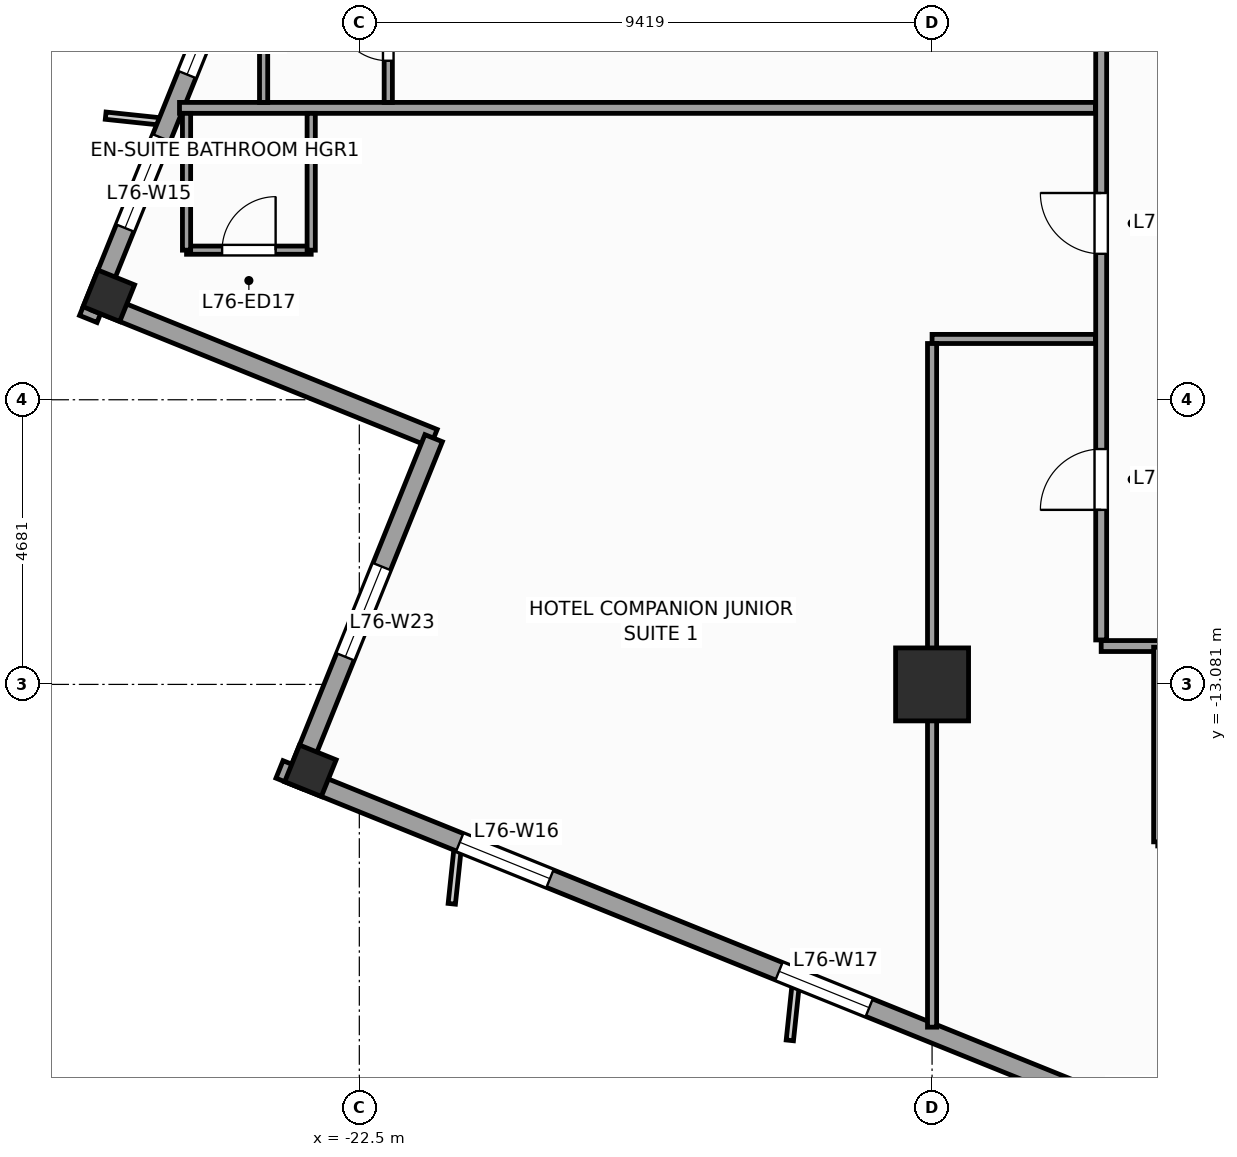
"""IFC4 building model, lengths in metres.
Left out: names, types, materials, properties, quantities, classifications, styles, units other than length and angle.
Written with IfcOpenShell. Run it as: python <this file> out.ifc"""

import sys

from ifc_helpers import new_model, si_unit, direction, frame, frame_2d, origin, origin_2d, place, context, subcontext, project, spatial, rectangle, extrude, source, transform, mapped, element, fill, save


model = new_model("IFC4")
c1 = context("Model", 3, precision=1e-05, world=origin(), true_north=direction((0.0, 1.0)))
c2 = subcontext(c1, "Body", "Model", "MODEL_VIEW")
j1 = project(units=[si_unit("LENGTHUNIT", "METRE"), si_unit("PLANEANGLEUNIT", "RADIAN")], contexts=[c1])
p1 = place(None, origin())
s1 = spatial("IfcSite", under=j1, at=p1, CompositionType="ELEMENT")
p2 = place(p1, origin())
s2 = spatial("IfcBuilding", under=s1, at=p2, CompositionType="ELEMENT")
p3 = place(p2, frame((0.0, 0.0, 308.4)))
s3 = spatial("IfcBuildingStorey", under=s2, at=p3, CompositionType="ELEMENT", Elevation=308.4)
m1 = source(origin(), c2, "Body", "SweptSolid", [
    extrude(rectangle(XDim=1.2, YDim=1.2, at=origin_2d()), origin(), (0.0, 0.0, 1.0), 3.6),
])
p4 = place(p3, frame((-13.081, -13.081, 0.0), z_axis=(0.0, 0.0, 1.0), x_axis=(1.0, 0.0, 0.0)))
e1 = element("IfcColumn", 1, at=p4, inside=s3, PredefinedType="COLUMN", context=c2, shape_type="MappedRepresentation", body=[
    mapped(m1, transform((0.0, 0.0, 0.0), scale=1.0)),
])
m2 = source(origin(), c2, "Body", "SweptSolid", [
    extrude(rectangle(XDim=0.65, YDim=0.65, at=origin_2d()), origin(), (0.0, 0.0, 1.0), 3.6),
])
for number, where, z_axis, x_axis in (
    (2, (-26.62, -6.69, 0.0), (0.0, 0.0, 1.0), (0.375, 0.927, 0.0)),
    (3, (-23.304, -14.501, 0.0), (0.0, 0.0, 1.0), (0.375, 0.927, 0.0)),
):
    element("IfcColumn", number, at=place(p3, frame(where, z_axis=z_axis, x_axis=x_axis)), inside=s3, PredefinedType="COLUMN", context=c2, shape_type="MappedRepresentation", body=[
        mapped(m2, transform((0.0, 0.0, 0.0), scale=1.0)),
    ])
p5 = place(p3, frame((-14.479, 23.813, 0.0), z_axis=(0.0, 0.0, 1.0), x_axis=(-0.374609557019, -0.927182657188, 0.0)))
e4 = element("IfcWall", 4, at=p5, inside=s3, PredefinedType="STANDARD", context=c2, shape_type="SweptSolid", body=[
    extrude(rectangle(XDim=33.31, YDim=0.31, at=frame_2d((16.655, 0.0))), origin(), (0.0, 0.0, 1.0), 2.75),
])
p6 = place(p5, frame((3.197, 0.0, 0.47)))
e5 = element("IfcOpeningElement", 5, at=p6, cuts=e4, PredefinedType="OPENING", context=c2, shape_type="SweptSolid", body=[
    extrude(rectangle(XDim=1.6, YDim=2.1, at=frame_2d((0.8, 1.05))), frame((0.0, 0.165, 0.0), z_axis=(0.0, -1.0, 0.0), x_axis=(1.0, 0.0, 0.0)), (0.0, 0.0, 1.0), 0.33),
])
p7 = place(p5, frame((8.86, 0.0, 0.47)))
e6 = element("IfcOpeningElement", 6, at=p7, cuts=e4, PredefinedType="OPENING", context=c2, shape_type="SweptSolid", body=[
    extrude(rectangle(XDim=1.6, YDim=2.1, at=frame_2d((0.8, 1.05))), frame((0.0, 0.165, 0.0), z_axis=(0.0, -1.0, 0.0), x_axis=(1.0, 0.0, 0.0)), (0.0, 0.0, 1.0), 0.33),
])
p8 = place(p5, frame((14.439, 0.0, 0.47)))
e7 = element("IfcOpeningElement", 7, at=p8, cuts=e4, PredefinedType="OPENING", context=c2, shape_type="SweptSolid", body=[
    extrude(rectangle(XDim=1.6, YDim=2.1, at=frame_2d((0.8, 1.05))), frame((0.0, 0.165, 0.0), z_axis=(0.0, -1.0, 0.0), x_axis=(1.0, 0.0, 0.0)), (0.0, 0.0, 1.0), 0.33),
])
p9 = place(p5, frame((21.851, 0.0, 0.47)))
e8 = element("IfcOpeningElement", 8, at=p9, cuts=e4, PredefinedType="OPENING", context=c2, shape_type="SweptSolid", body=[
    extrude(rectangle(XDim=1.6, YDim=2.1, at=frame_2d((0.8, 1.05))), frame((0.0, 0.165, 0.0), z_axis=(0.0, -1.0, 0.0), x_axis=(1.0, 0.0, 0.0)), (0.0, 0.0, 1.0), 0.33),
])
p10 = place(p5, frame((30.097, 0.0, 0.47)))
e9 = element("IfcOpeningElement", 9, at=p10, cuts=e4, PredefinedType="OPENING", context=c2, shape_type="SweptSolid", body=[
    extrude(rectangle(XDim=1.6, YDim=2.1, at=frame_2d((0.8, 1.05))), frame((0.0, 0.165, 0.0), z_axis=(0.0, -1.0, 0.0), x_axis=(1.0, 0.0, 0.0)), (0.0, 0.0, 1.0), 0.33),
])
p11 = place(p5, frame((27.374, 0.0, 0.47)))
e10 = element("IfcOpeningElement", 10, at=p11, cuts=e4, PredefinedType="OPENING", context=c2, shape_type="SweptSolid", body=[
    extrude(rectangle(XDim=1.6, YDim=2.1, at=frame_2d((0.8, 1.05))), frame((0.0, 0.165, 0.0), z_axis=(0.0, -1.0, 0.0), x_axis=(1.0, 0.0, 0.0)), (0.0, 0.0, 1.0), 0.33),
])
p12 = place(p3, frame((-26.841, -6.784, 0.0), z_axis=(0.0, 0.0, 1.0), x_axis=(0.927171722085, -0.374636620962, 0.0)))
e11 = element("IfcWall", 11, at=p12, inside=s3, PredefinedType="STANDARD", context=c2, shape_type="SweptSolid", body=[
    extrude(rectangle(XDim=6.0, YDim=0.31, at=frame_2d((3.0, 0.0))), origin(), (0.0, 0.0, 1.0), 2.65),
])
p13 = place(p3, frame((-21.278, -9.032, 0.0), z_axis=(0.0, 0.0, 1.0), x_axis=(-0.374602739196, -0.927185411764, 0.0)))
e12 = element("IfcWall", 12, at=p13, inside=s3, PredefinedType="STANDARD", context=c2, shape_type="SweptSolid", body=[
    extrude(rectangle(XDim=6.155, YDim=0.31, at=frame_2d((3.078, 0.0))), origin(), (0.0, 0.0, 1.0), 3.35),
])
p14 = place(p13, frame((2.278, 0.0, 0.47)))
e13 = element("IfcOpeningElement", 13, at=p14, cuts=e12, PredefinedType="OPENING", context=c2, shape_type="SweptSolid", body=[
    extrude(rectangle(XDim=1.6, YDim=2.1, at=frame_2d((0.8, 1.05))), frame((0.0, 0.165, 0.0), z_axis=(0.0, -1.0, 0.0), x_axis=(1.0, 0.0, 0.0)), (0.0, 0.0, 1.0), 0.33),
])
p15 = place(p3, frame((-23.813, -14.479, 0.0), z_axis=(0.0, 0.0, 1.0), x_axis=(0.927182657188, -0.374609557019, 0.0)))
e14 = element("IfcWall", 14, at=p15, inside=s3, PredefinedType="STANDARD", context=c2, shape_type="SweptSolid", body=[
    extrude(rectangle(XDim=33.31, YDim=0.31, at=frame_2d((16.655, 0.0))), origin(), (0.0, 0.0, 1.0), 2.75),
])
p16 = place(p15, frame((20.88, 0.0, 0.0)))
e15 = element("IfcOpeningElement", 15, at=p16, cuts=e14, PredefinedType="OPENING", context=c2, shape_type="SweptSolid", body=[
    extrude(rectangle(XDim=1.05, YDim=2.25, at=frame_2d((0.525, 1.125))), frame((0.0, 0.165, 0.0), z_axis=(0.0, -1.0, 0.0), x_axis=(1.0, 0.0, 0.0)), (0.0, 0.0, 1.0), 0.33),
])
p17 = place(p15, frame((3.197, 0.0, 0.47)))
e16 = element("IfcOpeningElement", 16, at=p17, cuts=e14, PredefinedType="OPENING", context=c2, shape_type="SweptSolid", body=[
    extrude(rectangle(XDim=1.6, YDim=2.1, at=frame_2d((0.8, 1.05))), frame((0.0, 0.165, 0.0), z_axis=(0.0, -1.0, 0.0), x_axis=(1.0, 0.0, 0.0)), (0.0, 0.0, 1.0), 0.33),
])
p18 = place(p15, frame((8.86, 0.0, 0.47)))
e17 = element("IfcOpeningElement", 17, at=p18, cuts=e14, PredefinedType="OPENING", context=c2, shape_type="SweptSolid", body=[
    extrude(rectangle(XDim=1.6, YDim=2.1, at=frame_2d((0.8, 1.05))), frame((0.0, 0.165, 0.0), z_axis=(0.0, -1.0, 0.0), x_axis=(1.0, 0.0, 0.0)), (0.0, 0.0, 1.0), 0.33),
])
p19 = place(p15, frame((14.439, 0.0, 0.47)))
e18 = element("IfcOpeningElement", 18, at=p19, cuts=e14, PredefinedType="OPENING", context=c2, shape_type="SweptSolid", body=[
    extrude(rectangle(XDim=1.6, YDim=2.1, at=frame_2d((0.8, 1.05))), frame((0.0, 0.165, 0.0), z_axis=(0.0, -1.0, 0.0), x_axis=(1.0, 0.0, 0.0)), (0.0, 0.0, 1.0), 0.33),
])
p20 = place(p15, frame((23.351, 0.0, 0.47)))
e19 = element("IfcOpeningElement", 19, at=p20, cuts=e14, PredefinedType="OPENING", context=c2, shape_type="SweptSolid", body=[
    extrude(rectangle(XDim=1.6, YDim=2.1, at=frame_2d((0.8, 1.05))), frame((0.0, 0.165, 0.0), z_axis=(0.0, -1.0, 0.0), x_axis=(1.0, 0.0, 0.0)), (0.0, 0.0, 1.0), 0.33),
])
p21 = place(p15, frame((29.347, 0.0, 0.47)))
e20 = element("IfcOpeningElement", 20, at=p21, cuts=e14, PredefinedType="OPENING", context=c2, shape_type="SweptSolid", body=[
    extrude(rectangle(XDim=1.6, YDim=2.1, at=frame_2d((0.8, 1.05))), frame((0.0, 0.165, 0.0), z_axis=(0.0, -1.0, 0.0), x_axis=(1.0, 0.0, 0.0)), (0.0, 0.0, 1.0), 0.33),
])
p22 = place(p3, frame((-10.3, -12.45, 0.0), z_axis=(0.0, 0.0, 1.0), x_axis=(1.0, 0.0, 0.0)))
e21 = element("IfcWall", 21, at=p22, inside=s3, PredefinedType="PARTITIONING", context=c2, shape_type="SweptSolid", body=[
    extrude(rectangle(XDim=20.6, YDim=0.18, at=frame_2d((10.3, 0.0))), origin(), (0.0, 0.0, 1.0), 3.35),
])
p23 = place(p22, frame((1.605, 0.0, 0.0)))
e22 = element("IfcOpeningElement", 22, at=p23, cuts=e21, PredefinedType="OPENING", context=c2, shape_type="SweptSolid", body=[
    extrude(rectangle(XDim=0.95, YDim=2.1, at=frame_2d((0.475, 1.05))), frame((0.0, 0.1, 0.0), z_axis=(0.0, -1.0, 0.0), x_axis=(1.0, 0.0, 0.0)), (0.0, 0.0, 1.0), 0.2),
])
p24 = place(p22, frame((16.036, 0.0, 0.0)))
e23 = element("IfcOpeningElement", 23, at=p24, cuts=e21, PredefinedType="OPENING", context=c2, shape_type="SweptSolid", body=[
    extrude(rectangle(XDim=1.0, YDim=2.15, at=frame_2d((0.5, 1.075))), frame((0.0, 0.1, 0.0), z_axis=(0.0, -1.0, 0.0), x_axis=(1.0, 0.0, 0.0)), (0.0, 0.0, 1.0), 0.2),
])
p25 = place(p22, frame((9.55, 0.0, 0.0)))
e24 = element("IfcOpeningElement", 24, at=p25, cuts=e21, PredefinedType="OPENING", context=c2, shape_type="SweptSolid", body=[
    extrude(rectangle(XDim=1.0, YDim=2.15, at=frame_2d((0.5, 1.075))), frame((0.0, 0.1, 0.0), z_axis=(0.0, -1.0, 0.0), x_axis=(1.0, 0.0, 0.0)), (0.0, 0.0, 1.0), 0.2),
])
p26 = place(p3, frame((-10.3, -12.35, 0.0), z_axis=(0.0, 0.0, 1.0), x_axis=(0.0, 1.0, 0.0)))
e25 = element("IfcWall", 25, at=p26, inside=s3, PredefinedType="PARTITIONING", context=c2, shape_type="SweptSolid", body=[
    extrude(rectangle(XDim=24.7, YDim=0.18, at=frame_2d((12.35, 0.0))), origin(), (0.0, 0.0, 1.0), 3.35),
])
p27 = place(p26, frame((16.15, 0.0, 0.0)))
e26 = element("IfcOpeningElement", 26, at=p27, cuts=e25, PredefinedType="OPENING", context=c2, shape_type="SweptSolid", body=[
    extrude(rectangle(XDim=1.0, YDim=2.15, at=frame_2d((0.5, 1.075))), frame((0.0, 0.1, 0.0), z_axis=(0.0, -1.0, 0.0), x_axis=(1.0, 0.0, 0.0)), (0.0, 0.0, 1.0), 0.2),
])
p28 = place(p26, frame((2.139, 0.0, 0.0)))
e27 = element("IfcOpeningElement", 27, at=p28, cuts=e25, PredefinedType="OPENING", context=c2, shape_type="SweptSolid", body=[
    extrude(rectangle(XDim=1.0, YDim=2.15, at=frame_2d((0.5, 1.075))), frame((0.0, 0.1, 0.0), z_axis=(0.0, -1.0, 0.0), x_axis=(1.0, 0.0, 0.0)), (0.0, 0.0, 1.0), 0.2),
])
p29 = place(p26, frame((6.35, 0.0, 0.0)))
e28 = element("IfcOpeningElement", 28, at=p29, cuts=e25, PredefinedType="OPENING", context=c2, shape_type="SweptSolid", body=[
    extrude(rectangle(XDim=1.0, YDim=2.15, at=frame_2d((0.5, 1.075))), frame((0.0, 0.1, 0.0), z_axis=(0.0, -1.0, 0.0), x_axis=(1.0, 0.0, 0.0)), (0.0, 0.0, 1.0), 0.2),
])
p30 = place(p26, frame((10.65, 0.0, 0.0)))
e29 = element("IfcOpeningElement", 29, at=p30, cuts=e25, PredefinedType="OPENING", context=c2, shape_type="SweptSolid", body=[
    extrude(rectangle(XDim=1.0, YDim=2.15, at=frame_2d((0.5, 1.075))), frame((0.0, 0.1, 0.0), z_axis=(0.0, -1.0, 0.0), x_axis=(1.0, 0.0, 0.0)), (0.0, 0.0, 1.0), 0.2),
])
p31 = place(p3, frame((-10.395, -3.6, 0.0), z_axis=(0.0, 0.0, 1.0), x_axis=(-1.0, 0.0, 0.0)))
e30 = element("IfcWall", 30, at=p31, inside=s3, PredefinedType="PARTITIONING", context=c2, shape_type="SweptSolid", body=[
    extrude(rectangle(XDim=15.062, YDim=0.18, at=frame_2d((7.531, 0.0))), origin(), (0.0, 0.0, 1.0), 3.35),
])
p32 = place(p3, frame((-10.395, -7.4, 0.0), z_axis=(0.0, 0.0, 1.0), x_axis=(-1.0, 0.0, 0.0)))
e31 = element("IfcWall", 31, at=p32, inside=s3, PredefinedType="PARTITIONING", context=c2, shape_type="SweptSolid", body=[
    extrude(rectangle(XDim=2.686, YDim=0.15, at=frame_2d((1.343, 0.0))), origin(), (0.0, 0.0, 1.0), 3.35),
])
p33 = place(p3, frame((-13.081, -7.475, 0.0), z_axis=(0.0, 0.0, 1.0), x_axis=(0.0, -1.0, 0.0)))
e32 = element("IfcWall", 32, at=p33, inside=s3, PredefinedType="PARTITIONING", context=c2, shape_type="SweptSolid", body=[
    extrude(rectangle(XDim=11.243, YDim=0.15, at=frame_2d((5.621, 0.0))), origin(), (0.0, 0.0, 1.0), 2.45),
])
p34 = place(p3, frame((-9.37, -15.67, 0.0), z_axis=(0.0, 0.0, 1.0), x_axis=(0.0, 1.0, 0.0)))
e33 = element("IfcWall", 33, at=p34, inside=s3, PredefinedType="PARTITIONING", context=c2, shape_type="SweptSolid", body=[
    extrude(rectangle(XDim=3.2, YDim=0.135, at=frame_2d((1.6, 0.0))), origin(), (0.0, 0.0, 1.0), 3.35),
])
p35 = place(p3, frame((-25.342, -5.94, 0.0), z_axis=(0.0, 0.0, 1.0), x_axis=(1.0, 0.0, 0.0)))
e34 = element("IfcWall", 34, at=p35, inside=s3, PredefinedType="PARTITIONING", context=c2, shape_type="SweptSolid", body=[
    extrude(rectangle(XDim=2.05, YDim=0.135, at=frame_2d((1.025, 0.0))), origin(), (0.0, 0.0, 1.0), 3.35),
])
p36 = place(p35, frame((0.585, 0.0, 0.0)))
e35 = element("IfcOpeningElement", 35, at=p36, cuts=e34, PredefinedType="OPENING", context=c2, shape_type="SweptSolid", body=[
    extrude(rectangle(XDim=0.88, YDim=2.1, at=frame_2d((0.44, 1.05))), frame((0.0, 0.078, 0.0), z_axis=(0.0, -1.0, 0.0), x_axis=(1.0, 0.0, 0.0)), (0.0, 0.0, 1.0), 0.155),
])
p37 = place(p3, frame((-23.292, -5.94, 0.0), z_axis=(0.0, 0.0, 1.0), x_axis=(0.0, 1.0, 0.0)))
e36 = element("IfcWall", 36, at=p37, inside=s3, PredefinedType="PARTITIONING", context=c2, shape_type="SweptSolid", body=[
    extrude(rectangle(XDim=2.25, YDim=0.135, at=frame_2d((1.125, 0.0))), origin(), (0.0, 0.0, 1.0), 2.95),
])
p38 = place(p3, frame((-25.342, -5.94, 0.0), z_axis=(0.0, 0.0, 1.0), x_axis=(0.0, 1.0, 0.0)))
e37 = element("IfcWall", 37, at=p38, inside=s3, PredefinedType="PARTITIONING", context=c2, shape_type="SweptSolid", body=[
    extrude(rectangle(XDim=2.25, YDim=0.135, at=frame_2d((1.125, 0.0))), origin(), (0.0, 0.0, 1.0), 2.75),
])
p39 = place(p3, frame((-22.024, -3.51, 0.0), z_axis=(0.0, 0.0, 1.0), x_axis=(0.0, 1.0, 0.0)))
e38 = element("IfcWall", 38, at=p39, inside=s3, PredefinedType="PARTITIONING", context=c2, shape_type="SweptSolid", body=[
    extrude(rectangle(XDim=2.25, YDim=0.135, at=frame_2d((1.125, 0.0))), origin(), (0.0, 0.0, 1.0), 3.35),
])
p40 = place(p39, frame((0.685, 0.0, 0.0)))
e39 = element("IfcOpeningElement", 39, at=p40, cuts=e38, PredefinedType="OPENING", context=c2, shape_type="SweptSolid", body=[
    extrude(rectangle(XDim=0.88, YDim=2.1, at=frame_2d((0.44, 1.05))), frame((0.0, 0.078, 0.0), z_axis=(0.0, -1.0, 0.0), x_axis=(1.0, 0.0, 0.0)), (0.0, 0.0, 1.0), 0.155),
])
p41 = place(p3, frame((-24.074, -3.51, 0.0), z_axis=(0.0, 0.0, 1.0), x_axis=(0.0, 1.0, 0.0)))
e40 = element("IfcWall", 40, at=p41, inside=s3, PredefinedType="PARTITIONING", context=c2, shape_type="SweptSolid", body=[
    extrude(rectangle(XDim=2.25, YDim=0.135, at=frame_2d((1.125, 0.0))), origin(), (0.0, 0.0, 1.0), 3.35),
])
m3 = source(origin(), c2, "Body", "SweptSolid", [
    extrude(rectangle(XDim=1.6, YDim=2.1, at=frame_2d((0.8, 1.05))), frame((0.0, 0.03, 0.0), z_axis=(0.0, -1.0, 0.0), x_axis=(1.0, 0.0, 0.0)), (0.0, 0.0, 1.0), 0.06),
])
p42 = place(p10, origin())
e41 = element("IfcWindow", 41, at=p42, inside=s3, PartitioningType="SINGLE_PANEL", PredefinedType="WINDOW", context=c2, shape_type="MappedRepresentation", body=[
    mapped(m3, transform((0.0, 0.0, 0.0), scale=1.0)),
])
fill(e9, e41)
p43 = place(p17, origin())
e42 = element("IfcWindow", 42, at=p43, inside=s3, PartitioningType="SINGLE_PANEL", PredefinedType="WINDOW", context=c2, shape_type="MappedRepresentation", body=[
    mapped(m3, transform((0.0, 0.0, 0.0), scale=1.0)),
])
fill(e16, e42)
p44 = place(p18, origin())
e43 = element("IfcWindow", 43, at=p44, inside=s3, PartitioningType="SINGLE_PANEL", PredefinedType="WINDOW", context=c2, shape_type="MappedRepresentation", body=[
    mapped(m3, transform((0.0, 0.0, 0.0), scale=1.0)),
])
fill(e17, e43)
p45 = place(p14, origin())
e44 = element("IfcWindow", 44, at=p45, inside=s3, PartitioningType="SINGLE_PANEL", PredefinedType="WINDOW", context=c2, shape_type="MappedRepresentation", body=[
    mapped(m3, transform((0.0, 0.0, 0.0), scale=1.0)),
])
fill(e13, e44)
m4 = source(origin(), c2, "Body", "SweptSolid", [
    extrude(rectangle(XDim=1.0, YDim=2.15, at=frame_2d((0.5, 1.075))), frame((0.0, 0.025, 0.0), z_axis=(0.0, -1.0, 0.0), x_axis=(1.0, 0.0, 0.0)), (0.0, 0.0, 1.0), 0.05),
])
p46 = place(p28, origin())
e45 = element("IfcDoor", 45, at=p46, inside=s3, OperationType="SINGLE_SWING_LEFT", PredefinedType="DOOR", context=c2, shape_type="MappedRepresentation", body=[
    mapped(m4, transform((0.0, 0.0, 0.0), scale=1.0)),
])
fill(e27, e45)
p47 = place(p29, origin())
e46 = element("IfcDoor", 46, at=p47, inside=s3, OperationType="SINGLE_SWING_RIGHT", PredefinedType="DOOR", context=c2, shape_type="MappedRepresentation", body=[
    mapped(m4, transform((0.0, 0.0, 0.0), scale=1.0)),
])
fill(e28, e46)
m5 = source(origin(), c2, "Body", "SweptSolid", [
    extrude(rectangle(XDim=0.88, YDim=2.1, at=frame_2d((0.44, 1.05))), frame((0.0, 0.025, 0.0), z_axis=(0.0, -1.0, 0.0), x_axis=(1.0, 0.0, 0.0)), (0.0, 0.0, 1.0), 0.05),
])
p48 = place(p36, origin())
e47 = element("IfcDoor", 47, at=p48, inside=s3, OperationType="SINGLE_SWING_RIGHT", PredefinedType="DOOR", context=c2, shape_type="MappedRepresentation", body=[
    mapped(m5, transform((0.0, 0.0, 0.0), scale=1.0)),
])
fill(e35, e47)
p49 = place(p40, origin())
e48 = element("IfcDoor", 48, at=p49, inside=s3, OperationType="SINGLE_SWING_RIGHT", PredefinedType="DOOR", context=c2, shape_type="MappedRepresentation", body=[
    mapped(m5, transform((0.0, 0.0, 0.0), scale=1.0)),
])
fill(e39, e48)
p50 = place(p11, origin())
e49 = element("IfcWindow", 49, at=p50, inside=s3, PartitioningType="SINGLE_PANEL", PredefinedType="WINDOW", context=c2, shape_type="MappedRepresentation", body=[
    mapped(m3, transform((0.0, 0.0, 0.0), scale=1.0)),
])
fill(e10, e49)
save(model, sys.argv[1])
